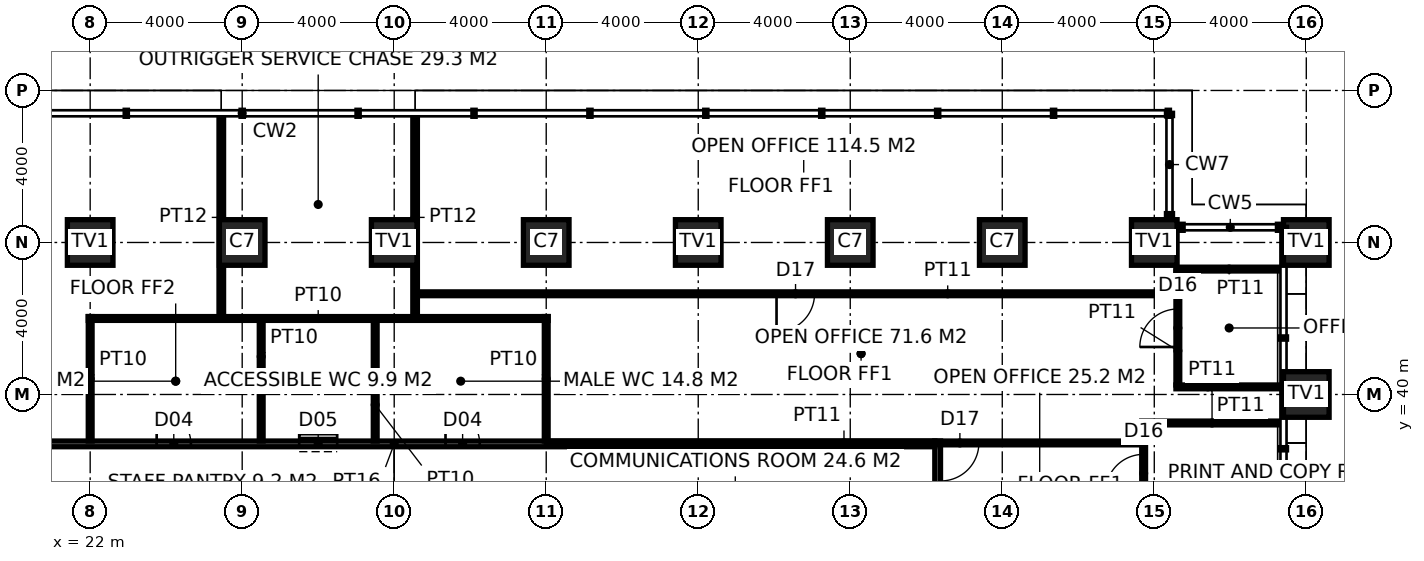
"""IFC4 building model, lengths in metres.
Left out: names, types, materials, properties, quantities, classifications, styles, units other than length and angle.
Written with IfcOpenShell. Run it as: python <this file> out.ifc"""

import sys

from ifc_helpers import new_model, si_unit, direction, frame, frame_2d, origin, origin_2d, place, context, subcontext, project, spatial, rectangle, hollow_rectangle, extrude, element, fill, save


model = new_model("IFC4")
c1 = context("Model", 3, precision=1e-05, world=origin(), true_north=direction((0.0, 1.0)))
c2 = subcontext(c1, "Body", "Model", "MODEL_VIEW")
j1 = project(units=[si_unit("LENGTHUNIT", "METRE"), si_unit("PLANEANGLEUNIT", "RADIAN")], contexts=[c1])
p1 = place(None, origin())
s1 = spatial("IfcSite", under=j1, at=p1, CompositionType="ELEMENT")
p2 = place(p1, origin())
s2 = spatial("IfcBuilding", under=s1, at=p2, CompositionType="ELEMENT")
p3 = place(p2, frame((0.0, 0.0, 43.0)))
s3 = spatial("IfcBuildingStorey", under=s2, at=p3, CompositionType="ELEMENT", Elevation=43.0)
for number, where, z_axis, x_axis in (
    (1, (54.0, 40.0, 0.0), (0.0, 0.0, 1.0), (1.0, 0.0, 0.0)),
    (2, (54.0, 44.0, 0.0), (0.0, 0.0, 1.0), (1.0, 0.0, 0.0)),
    (3, (22.0, 44.0, 0.0), (0.0, 0.0, 1.0), (1.0, 0.0, 0.0)),
    (4, (30.0, 44.0, 0.0), (0.0, 0.0, 1.0), (1.0, 0.0, 0.0)),
    (5, (38.0, 44.0, 0.0), (0.0, 0.0, 1.0), (1.0, 0.0, 0.0)),
    (6, (50.0, 44.0, 0.0), (0.0, 0.0, 1.0), (1.0, 0.0, 0.0)),
):
    element("IfcColumn", number, at=place(p3, frame(where, z_axis=z_axis, x_axis=x_axis)), inside=s3, PredefinedType="USERDEFINED", context=c2, shape_type="SweptSolid", body=[
        extrude(hollow_rectangle(XDim=1.2, YDim=1.2, WallThickness=0.1, at=origin_2d()), origin(), (0.0, 0.0, 1.0), 4.0),
    ])
for number, where, z_axis, x_axis in (
    (7, (26.0, 44.0, 0.0), (0.0, 0.0, 1.0), (1.0, 0.0, 0.0)),
    (8, (34.0, 44.0, 0.0), (0.0, 0.0, 1.0), (1.0, 0.0, 0.0)),
    (9, (42.0, 44.0, 0.0), (0.0, 0.0, 1.0), (1.0, 0.0, 0.0)),
    (10, (46.0, 44.0, 0.0), (0.0, 0.0, 1.0), (1.0, 0.0, 0.0)),
):
    element("IfcColumn", number, at=place(p3, frame(where, z_axis=z_axis, x_axis=x_axis)), inside=s3, PredefinedType="COLUMN", context=c2, shape_type="SweptSolid", body=[
        extrude(hollow_rectangle(XDim=1.2, YDim=1.2, WallThickness=0.1, at=origin_2d()), origin(), (0.0, 0.0, 1.0), 4.0),
    ])
p4 = place(p3, frame((44.3, 15.225, 0.0), z_axis=(0.0, 0.0, 1.0), x_axis=(0.0, 1.0, 0.0)))
e11 = element("IfcWall", 11, at=p4, inside=s3, PredefinedType="PARTITIONING", context=c2, shape_type="SweptSolid", body=[
    extrude(rectangle(XDim=23.55, YDim=0.15, at=frame_2d((11.775, 0.0))), origin(), (0.0, 0.0, 1.0), 3.85),
])
p5 = place(p4, frame((2.224, 0.0, 0.0)))
e12 = element("IfcOpeningElement", 12, at=p5, cuts=e11, PredefinedType="OPENING", context=c2, shape_type="SweptSolid", body=[
    extrude(rectangle(XDim=1.8, YDim=2.4, at=frame_2d((0.9, 1.2))), frame((0.0, 0.085, 0.0), z_axis=(0.0, -1.0, 0.0), x_axis=(1.0, 0.0, 0.0)), (0.0, 0.0, 1.0), 0.17),
])
p6 = place(p4, frame((17.475, 0.0, 0.0)))
e13 = element("IfcOpeningElement", 13, at=p6, cuts=e11, PredefinedType="OPENING", context=c2, shape_type="SweptSolid", body=[
    extrude(rectangle(XDim=1.8, YDim=2.4, at=frame_2d((0.9, 1.2))), frame((0.0, 0.085, 0.0), z_axis=(0.0, -1.0, 0.0), x_axis=(1.0, 0.0, 0.0)), (0.0, 0.0, 1.0), 0.17),
])
p7 = place(p4, frame((10.275, 0.0, 0.0)))
e14 = element("IfcOpeningElement", 14, at=p7, cuts=e11, PredefinedType="OPENING", context=c2, shape_type="SweptSolid", body=[
    extrude(rectangle(XDim=1.0, YDim=2.2, at=frame_2d((0.5, 1.1))), frame((0.0, 0.085, 0.0), z_axis=(0.0, -1.0, 0.0), x_axis=(1.0, 0.0, 0.0)), (0.0, 0.0, 1.0), 0.17),
])
p8 = place(p3, frame((15.775, 38.7, 0.0), z_axis=(0.0, 0.0, 1.0), x_axis=(1.0, 0.0, 0.0)))
e15 = element("IfcWall", 15, at=p8, inside=s3, PredefinedType="PARTITIONING", context=c2, shape_type="SweptSolid", body=[
    extrude(rectangle(XDim=28.45, YDim=0.15, at=frame_2d((14.225, 0.0))), origin(), (0.0, 0.0, 1.0), 3.85),
])
p9 = place(p8, frame((7.975, 0.0, 0.0)))
e16 = element("IfcOpeningElement", 16, at=p9, cuts=e15, PredefinedType="OPENING", context=c2, shape_type="SweptSolid", body=[
    extrude(rectangle(XDim=0.9, YDim=2.1, at=frame_2d((0.45, 1.05))), frame((0.0, 0.085, 0.0), z_axis=(0.0, -1.0, 0.0), x_axis=(1.0, 0.0, 0.0)), (0.0, 0.0, 1.0), 0.17),
])
p10 = place(p8, frame((11.725, 0.0, 0.0)))
e17 = element("IfcOpeningElement", 17, at=p10, cuts=e15, PredefinedType="OPENING", context=c2, shape_type="SweptSolid", body=[
    extrude(rectangle(XDim=1.0, YDim=2.1, at=frame_2d((0.5, 1.05))), frame((0.0, 0.085, 0.0), z_axis=(0.0, -1.0, 0.0), x_axis=(1.0, 0.0, 0.0)), (0.0, 0.0, 1.0), 0.17),
])
p11 = place(p8, frame((15.575, 0.0, 0.0)))
e18 = element("IfcOpeningElement", 18, at=p11, cuts=e15, PredefinedType="OPENING", context=c2, shape_type="SweptSolid", body=[
    extrude(rectangle(XDim=0.9, YDim=2.1, at=frame_2d((0.45, 1.05))), frame((0.0, 0.085, 0.0), z_axis=(0.0, -1.0, 0.0), x_axis=(1.0, 0.0, 0.0)), (0.0, 0.0, 1.0), 0.17),
])
for number, where, z_axis, x_axis in (
    (19, (22.0, 38.775, 0.0), (0.0, 0.0, 1.0), (0.0, 1.0, 0.0)),
    (20, (34.0, 38.775, 0.0), (0.0, 0.0, 1.0), (0.0, 1.0, 0.0)),
):
    element("IfcWall", number, at=place(p3, frame(where, z_axis=z_axis, x_axis=x_axis)), inside=s3, PredefinedType="PARTITIONING", context=c2, shape_type="SweptSolid", body=[
        extrude(rectangle(XDim=3.275, YDim=0.1, at=frame_2d((1.638, 0.0))), origin(), (0.0, 0.0, 1.0), 2.85),
    ])
p12 = place(p3, frame((21.95, 42.0, 0.0), z_axis=(0.0, 0.0, 1.0), x_axis=(1.0, 0.0, 0.0)))
e21 = element("IfcWall", 21, at=p12, inside=s3, PredefinedType="PARTITIONING", context=c2, shape_type="SweptSolid", body=[
    extrude(rectangle(XDim=12.1, YDim=0.1, at=frame_2d((6.05, 0.0))), origin(), (0.0, 0.0, 1.0), 3.85),
])
for number, where, z_axis, x_axis in (
    (22, (26.5, 38.775, 0.0), (0.0, 0.0, 1.0), (0.0, 1.0, 0.0)),
    (23, (29.5, 38.775, 0.0), (0.0, 0.0, 1.0), (0.0, 1.0, 0.0)),
):
    element("IfcWall", number, at=place(p3, frame(where, z_axis=z_axis, x_axis=x_axis)), inside=s3, PredefinedType="PARTITIONING", context=c2, shape_type="SweptSolid", body=[
        extrude(rectangle(XDim=3.175, YDim=0.1, at=frame_2d((1.587, 0.0))), origin(), (0.0, 0.0, 1.0), 2.85),
    ])
for number, where, z_axis, x_axis in (
    (24, (25.45, 42.0, 0.0), (0.0, 0.0, 1.0), (0.0, 1.0, 0.0)),
    (25, (30.55, 42.0, 0.0), (0.0, 0.0, 1.0), (0.0, 1.0, 0.0)),
):
    element("IfcWall", number, at=place(p3, frame(where, z_axis=z_axis, x_axis=x_axis)), inside=s3, PredefinedType="PARTITIONING", context=c2, shape_type="SweptSolid", body=[
        extrude(rectangle(XDim=5.32, YDim=0.12, at=frame_2d((2.66, 0.0))), origin(), (0.0, 0.0, 1.0), 3.85),
    ])
p13 = place(p3, frame((49.67, 39.25, 0.0), z_axis=(0.0, 0.0, 1.0), x_axis=(1.0, 0.0, 0.0)))
e26 = element("IfcWall", 26, at=p13, inside=s3, PredefinedType="PARTITIONING", context=c2, shape_type="SweptSolid", body=[
    extrude(rectangle(XDim=3.7, YDim=0.1, at=frame_2d((1.85, 0.0))), origin(), (0.0, 0.0, 1.0), 3.85),
])
for number, where, z_axis, x_axis in (
    (27, (50.57, 40.2, 0.0), (0.0, 0.0, 1.0), (1.0, 0.0, 0.0)),
    (28, (50.57, 43.3, 0.0), (0.0, 0.0, 1.0), (1.0, 0.0, 0.0)),
):
    element("IfcWall", number, at=place(p3, frame(where, z_axis=z_axis, x_axis=x_axis)), inside=s3, PredefinedType="PARTITIONING", context=c2, shape_type="SweptSolid", body=[
        extrude(rectangle(XDim=2.8, YDim=0.1, at=frame_2d((1.4, 0.0))), origin(), (0.0, 0.0, 1.0), 3.85),
    ])
p14 = place(p3, frame((49.72, 36.65, 0.0), z_axis=(0.0, 0.0, 1.0), x_axis=(0.0, 1.0, 0.0)))
e29 = element("IfcWall", 29, at=p14, inside=s3, PredefinedType="PARTITIONING", context=c2, shape_type="SweptSolid", body=[
    extrude(rectangle(XDim=2.55, YDim=0.1, at=frame_2d((1.275, 0.0))), origin(), (0.0, 0.0, 1.0), 2.65),
])
p15 = place(p14, frame((0.775, 0.0, 0.0)))
e30 = element("IfcOpeningElement", 30, at=p15, cuts=e29, PredefinedType="OPENING", context=c2, shape_type="SweptSolid", body=[
    extrude(rectangle(XDim=1.0, YDim=2.2, at=frame_2d((0.5, 1.1))), frame((0.0, 0.06, 0.0), z_axis=(0.0, -1.0, 0.0), x_axis=(1.0, 0.0, 0.0)), (0.0, 0.0, 1.0), 0.12),
])
p16 = place(p3, frame((50.62, 40.25, 0.0), z_axis=(0.0, 0.0, 1.0), x_axis=(0.0, 1.0, 0.0)))
e31 = element("IfcWall", 31, at=p16, inside=s3, PredefinedType="PARTITIONING", context=c2, shape_type="SweptSolid", body=[
    extrude(rectangle(XDim=3.0, YDim=0.1, at=frame_2d((1.5, 0.0))), origin(), (0.0, 0.0, 1.0), 3.85),
])
p17 = place(p16, frame((1.0, 0.0, 0.0)))
e32 = element("IfcOpeningElement", 32, at=p17, cuts=e31, PredefinedType="OPENING", context=c2, shape_type="SweptSolid", body=[
    extrude(rectangle(XDim=1.0, YDim=2.2, at=frame_2d((0.5, 1.1))), frame((0.0, 0.06, 0.0), z_axis=(0.0, -1.0, 0.0), x_axis=(1.0, 0.0, 0.0)), (0.0, 0.0, 1.0), 0.12),
])
p18 = place(p3, frame((49.67, 38.725, 0.0), z_axis=(0.0, 0.0, 1.0), x_axis=(-1.0, 0.0, 0.0)))
e33 = element("IfcWall", 33, at=p18, inside=s3, PredefinedType="PARTITIONING", context=c2, shape_type="SweptSolid", body=[
    extrude(rectangle(XDim=15.67, YDim=0.1, at=frame_2d((7.835, 0.0))), origin(), (0.0, 0.0, 1.0), 3.85),
])
p19 = place(p18, frame((4.285, 0.0, 0.0)))
e34 = element("IfcOpeningElement", 34, at=p19, cuts=e33, PredefinedType="OPENING", context=c2, shape_type="SweptSolid", body=[
    extrude(rectangle(XDim=1.0, YDim=2.2, at=frame_2d((0.5, 1.1))), frame((0.0, 0.06, 0.0), z_axis=(0.0, -1.0, 0.0), x_axis=(1.0, 0.0, 0.0)), (0.0, 0.0, 1.0), 0.12),
])
p20 = place(p3, frame((50.57, 42.65, 0.0), z_axis=(0.0, 0.0, 1.0), x_axis=(-1.0, 0.0, 0.0)))
e35 = element("IfcWall", 35, at=p20, inside=s3, PredefinedType="PARTITIONING", context=c2, shape_type="SweptSolid", body=[
    extrude(rectangle(XDim=20.019, YDim=0.1, at=frame_2d((10.01, 0.0))), origin(), (0.0, 0.0, 1.0), 3.85),
])
p21 = place(p20, frame((9.51, 0.0, 0.0)))
e36 = element("IfcOpeningElement", 36, at=p21, cuts=e35, PredefinedType="OPENING", context=c2, shape_type="SweptSolid", body=[
    extrude(rectangle(XDim=1.0, YDim=2.2, at=frame_2d((0.5, 1.1))), frame((0.0, 0.06, 0.0), z_axis=(0.0, -1.0, 0.0), x_axis=(1.0, 0.0, 0.0)), (0.0, 0.0, 1.0), 0.12),
])
p22 = place(p9, origin())
e37 = element("IfcDoor", 37, at=p22, inside=s3, OperationType="SINGLE_SWING_LEFT", PredefinedType="DOOR", context=c2, shape_type="SweptSolid", body=[
    extrude(rectangle(XDim=0.9, YDim=2.1, at=frame_2d((0.45, 1.05))), frame((0.0, 0.025, 0.0), z_axis=(0.0, -1.0, 0.0), x_axis=(1.0, 0.0, 0.0)), (0.0, 0.0, 1.0), 0.05),
])
fill(e16, e37)
p23 = place(p10, origin())
e38 = element("IfcDoor", 38, at=p23, inside=s3, OperationType="SLIDING_TO_LEFT", PredefinedType="DOOR", context=c2, shape_type="SweptSolid", body=[
    extrude(rectangle(XDim=1.0, YDim=2.1, at=frame_2d((0.5, 1.05))), frame((0.0, 0.025, 0.0), z_axis=(0.0, -1.0, 0.0), x_axis=(1.0, 0.0, 0.0)), (0.0, 0.0, 1.0), 0.05),
])
fill(e17, e38)
p24 = place(p11, origin())
e39 = element("IfcDoor", 39, at=p24, inside=s3, OperationType="SINGLE_SWING_LEFT", PredefinedType="DOOR", context=c2, shape_type="SweptSolid", body=[
    extrude(rectangle(XDim=0.9, YDim=2.1, at=frame_2d((0.45, 1.05))), frame((0.0, 0.025, 0.0), z_axis=(0.0, -1.0, 0.0), x_axis=(1.0, 0.0, 0.0)), (0.0, 0.0, 1.0), 0.05),
])
fill(e18, e39)
p25 = place(p15, origin())
e40 = element("IfcDoor", 40, at=p25, inside=s3, OperationType="SINGLE_SWING_LEFT", PredefinedType="DOOR", context=c2, shape_type="SweptSolid", body=[
    extrude(rectangle(XDim=1.0, YDim=2.2, at=frame_2d((0.5, 1.1))), frame((0.0, 0.025, 0.0), z_axis=(0.0, -1.0, 0.0), x_axis=(1.0, 0.0, 0.0)), (0.0, 0.0, 1.0), 0.05),
])
fill(e30, e40)
p26 = place(p17, origin())
e41 = element("IfcDoor", 41, at=p26, inside=s3, OperationType="SINGLE_SWING_LEFT", PredefinedType="DOOR", context=c2, shape_type="SweptSolid", body=[
    extrude(rectangle(XDim=1.0, YDim=2.2, at=frame_2d((0.5, 1.1))), frame((0.0, 0.025, 0.0), z_axis=(0.0, -1.0, 0.0), x_axis=(1.0, 0.0, 0.0)), (0.0, 0.0, 1.0), 0.05),
])
fill(e32, e41)
p27 = place(p19, origin())
e42 = element("IfcDoor", 42, at=p27, inside=s3, OperationType="SINGLE_SWING_RIGHT", PredefinedType="DOOR", context=c2, shape_type="SweptSolid", body=[
    extrude(rectangle(XDim=1.0, YDim=2.2, at=frame_2d((0.5, 1.1))), frame((0.0, 0.025, 0.0), z_axis=(0.0, -1.0, 0.0), x_axis=(1.0, 0.0, 0.0)), (0.0, 0.0, 1.0), 0.05),
])
fill(e34, e42)
p28 = place(p21, origin())
e43 = element("IfcDoor", 43, at=p28, inside=s3, OperationType="SINGLE_SWING_RIGHT", PredefinedType="DOOR", context=c2, shape_type="SweptSolid", body=[
    extrude(rectangle(XDim=1.0, YDim=2.2, at=frame_2d((0.5, 1.1))), frame((0.0, 0.025, 0.0), z_axis=(0.0, -1.0, 0.0), x_axis=(1.0, 0.0, 0.0)), (0.0, 0.0, 1.0), 0.05),
])
fill(e36, e43)
save(model, sys.argv[1])
